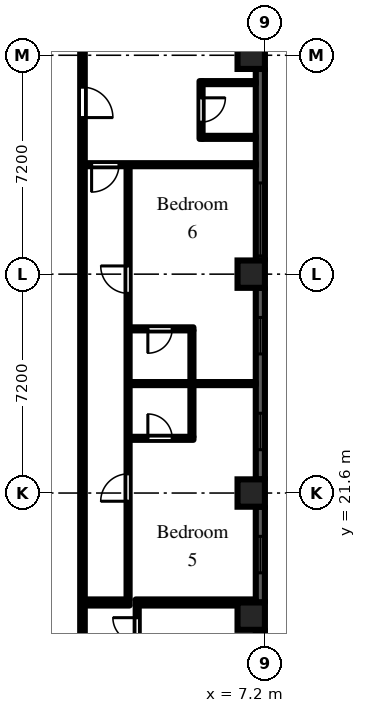
"""IFC4 building model, lengths in metres.
Left out: names, types, materials, properties, quantities, classifications, styles, units other than length and angle.
Written with IfcOpenShell. Run it as: python <this file> out.ifc"""

import sys

from ifc_helpers import new_model, si_unit, direction, frame, frame_2d, origin, origin_2d, place, context, subcontext, project, spatial, rectangle, extrude, element, fill, save


model = new_model("IFC4")
c1 = context("Model", 3, precision=1e-05, world=origin(), true_north=direction((0.0, 1.0)))
c2 = subcontext(c1, "Body", "Model", "MODEL_VIEW")
j1 = project(units=[si_unit("LENGTHUNIT", "METRE"), si_unit("PLANEANGLEUNIT", "RADIAN")], contexts=[c1])
p1 = place(None, origin())
s1 = spatial("IfcSite", under=j1, at=p1, CompositionType="ELEMENT")
p2 = place(p1, origin())
s2 = spatial("IfcBuilding", under=s1, at=p2, CompositionType="ELEMENT")
p3 = place(p2, frame((0.0, 0.0, 29.7)))
s3 = spatial("IfcBuildingStorey", under=s2, at=p3, CompositionType="ELEMENT", Elevation=29.7)
for number, where, z_axis, x_axis in (
    (1, (6.75, 17.55, 0.0), (0.0, 0.0, 1.0), (1.0, 0.0, 0.0)),
    (2, (6.75, 21.6, 0.0), (0.0, 0.0, 1.0), (1.0, 0.0, 0.0)),
    (3, (6.75, 28.8, 0.0), (0.0, 0.0, 1.0), (1.0, 0.0, 0.0)),
    (4, (6.75, 36.0, 0.0), (0.0, 0.0, 1.0), (1.0, 0.0, 0.0)),
):
    element("IfcColumn", number, at=place(p3, frame(where, z_axis=z_axis, x_axis=x_axis)), inside=s3, PredefinedType="COLUMN", context=c2, shape_type="SweptSolid", body=[
        extrude(rectangle(XDim=0.9, YDim=0.9, at=origin_2d()), origin(), (0.0, 0.0, 1.0), 3.0),
    ])
p4 = place(p3, frame((7.05, 15.3, 0.0), z_axis=(0.0, 0.0, 1.0), x_axis=(0.0, 1.0, 0.0)))
e5 = element("IfcWall", 5, at=p4, inside=s3, PredefinedType="SOLIDWALL", context=c2, shape_type="SweptSolid", body=[
    extrude(rectangle(XDim=1.8, YDim=0.3, at=frame_2d((0.9, 0.0))), origin(), (0.0, 0.0, 1.0), 2.1),
])
p5 = place(p4, frame((0.3, 0.0, 0.2)))
e6 = element("IfcOpeningElement", 6, at=p5, cuts=e5, PredefinedType="OPENING", context=c2, shape_type="SweptSolid", body=[
    extrude(rectangle(XDim=1.2, YDim=1.85, at=frame_2d((0.6, 0.925))), frame((0.0, 0.16, 0.0), z_axis=(0.0, -1.0, 0.0), x_axis=(1.0, 0.0, 0.0)), (0.0, 0.0, 1.0), 0.32),
])
p6 = place(p3, frame((7.05, 18.0, 0.0), z_axis=(0.0, 0.0, 1.0), x_axis=(0.0, 1.0, 0.0)))
e7 = element("IfcWall", 7, at=p6, inside=s3, PredefinedType="SOLIDWALL", context=c2, shape_type="SweptSolid", body=[
    extrude(rectangle(XDim=3.15, YDim=0.3, at=frame_2d((1.575, 0.0))), origin(), (0.0, 0.0, 1.0), 2.1),
])
p7 = place(p6, frame((0.975, 0.0, 0.2)))
e8 = element("IfcOpeningElement", 8, at=p7, cuts=e7, PredefinedType="OPENING", context=c2, shape_type="SweptSolid", body=[
    extrude(rectangle(XDim=1.2, YDim=1.85, at=frame_2d((0.6, 0.925))), frame((0.0, 0.16, 0.0), z_axis=(0.0, -1.0, 0.0), x_axis=(1.0, 0.0, 0.0)), (0.0, 0.0, 1.0), 0.32),
])
p8 = place(p3, frame((7.05, 22.05, 0.0), z_axis=(0.0, 0.0, 1.0), x_axis=(0.0, 1.0, 0.0)))
e9 = element("IfcWall", 9, at=p8, inside=s3, PredefinedType="SOLIDWALL", context=c2, shape_type="SweptSolid", body=[
    extrude(rectangle(XDim=6.3, YDim=0.3, at=frame_2d((3.15, 0.0))), origin(), (0.0, 0.0, 1.0), 2.1),
])
p9 = place(p8, frame((0.975, 0.0, 0.2)))
e10 = element("IfcOpeningElement", 10, at=p9, cuts=e9, PredefinedType="OPENING", context=c2, shape_type="SweptSolid", body=[
    extrude(rectangle(XDim=1.2, YDim=1.85, at=frame_2d((0.6, 0.925))), frame((0.0, 0.16, 0.0), z_axis=(0.0, -1.0, 0.0), x_axis=(1.0, 0.0, 0.0)), (0.0, 0.0, 1.0), 0.32),
])
p10 = place(p8, frame((4.125, 0.0, 0.2)))
e11 = element("IfcOpeningElement", 11, at=p10, cuts=e9, PredefinedType="OPENING", context=c2, shape_type="SweptSolid", body=[
    extrude(rectangle(XDim=1.2, YDim=1.85, at=frame_2d((0.6, 0.925))), frame((0.0, 0.16, 0.0), z_axis=(0.0, -1.0, 0.0), x_axis=(1.0, 0.0, 0.0)), (0.0, 0.0, 1.0), 0.32),
])
p11 = place(p3, frame((7.05, 29.25, 0.0), z_axis=(0.0, 0.0, 1.0), x_axis=(0.0, 1.0, 0.0)))
e12 = element("IfcWall", 12, at=p11, inside=s3, PredefinedType="SOLIDWALL", context=c2, shape_type="SweptSolid", body=[
    extrude(rectangle(XDim=6.3, YDim=0.3, at=frame_2d((3.15, 0.0))), origin(), (0.0, 0.0, 1.0), 2.1),
])
p12 = place(p11, frame((0.15, 0.0, 0.2)))
e13 = element("IfcOpeningElement", 13, at=p12, cuts=e12, PredefinedType="OPENING", context=c2, shape_type="SweptSolid", body=[
    extrude(rectangle(XDim=2.4, YDim=1.85, at=frame_2d((1.2, 0.925))), frame((0.0, 0.16, 0.0), z_axis=(0.0, -1.0, 0.0), x_axis=(1.0, 0.0, 0.0)), (0.0, 0.0, 1.0), 0.32),
])
p13 = place(p3, frame((1.2, 1.125, 0.0), z_axis=(0.0, 0.0, 1.0), x_axis=(0.0, 1.0, 0.0)))
e14 = element("IfcWall", 14, at=p13, inside=s3, PredefinedType="PARTITIONING", context=c2, shape_type="SweptSolid", body=[
    extrude(rectangle(XDim=35.375, YDim=0.15, at=frame_2d((17.688, 0.0))), origin(), (0.0, 0.0, 1.0), 2.575),
])
p14 = place(p13, frame((3.725, 0.0, 0.0)))
e15 = element("IfcOpeningElement", 15, at=p14, cuts=e14, PredefinedType="OPENING", context=c2, shape_type="SweptSolid", body=[
    extrude(rectangle(XDim=0.9, YDim=2.1, at=frame_2d((0.45, 1.05))), frame((0.0, 0.085, 0.0), z_axis=(0.0, -1.0, 0.0), x_axis=(1.0, 0.0, 0.0)), (0.0, 0.0, 1.0), 0.17),
])
p15 = place(p13, frame((7.425, 0.0, 0.0)))
e16 = element("IfcOpeningElement", 16, at=p15, cuts=e14, PredefinedType="OPENING", context=c2, shape_type="SweptSolid", body=[
    extrude(rectangle(XDim=0.9, YDim=2.1, at=frame_2d((0.45, 1.05))), frame((0.0, 0.085, 0.0), z_axis=(0.0, -1.0, 0.0), x_axis=(1.0, 0.0, 0.0)), (0.0, 0.0, 1.0), 0.17),
])
p16 = place(p13, frame((13.475, 0.0, 0.0)))
e17 = element("IfcOpeningElement", 17, at=p16, cuts=e14, PredefinedType="OPENING", context=c2, shape_type="SweptSolid", body=[
    extrude(rectangle(XDim=1.0, YDim=2.1, at=frame_2d((0.5, 1.05))), frame((0.0, 0.085, 0.0), z_axis=(0.0, -1.0, 0.0), x_axis=(1.0, 0.0, 0.0)), (0.0, 0.0, 1.0), 0.17),
])
p17 = place(p13, frame((32.825, 0.0, 0.0)))
e18 = element("IfcOpeningElement", 18, at=p17, cuts=e14, PredefinedType="OPENING", context=c2, shape_type="SweptSolid", body=[
    extrude(rectangle(XDim=1.0, YDim=2.1, at=frame_2d((0.5, 1.05))), frame((0.0, 0.085, 0.0), z_axis=(0.0, -1.0, 0.0), x_axis=(1.0, 0.0, 0.0)), (0.0, 0.0, 1.0), 0.17),
])
p18 = place(p3, frame((1.275, 18.0, 0.0), z_axis=(0.0, 0.0, 1.0), x_axis=(1.0, 0.0, 0.0)))
e19 = element("IfcWall", 19, at=p18, inside=s3, PredefinedType="PARTITIONING", context=c2, shape_type="SweptSolid", body=[
    extrude(rectangle(XDim=1.475, YDim=0.2, at=frame_2d((0.738, 0.0))), origin(), (0.0, 0.0, 1.0), 2.575),
])
p19 = place(p3, frame((1.275, 32.4, 0.0), z_axis=(0.0, 0.0, 1.0), x_axis=(1.0, 0.0, 0.0)))
e20 = element("IfcWall", 20, at=p19, inside=s3, PredefinedType="PARTITIONING", context=c2, shape_type="SweptSolid", body=[
    extrude(rectangle(XDim=5.625, YDim=0.1, at=frame_2d((2.812, 0.0))), origin(), (0.0, 0.0, 1.0), 2.575),
])
p20 = place(p19, frame((0.225, 0.0, 0.0)))
e21 = element("IfcOpeningElement", 21, at=p20, cuts=e20, PredefinedType="OPENING", context=c2, shape_type="SweptSolid", body=[
    extrude(rectangle(XDim=0.9, YDim=2.1, at=frame_2d((0.45, 1.05))), frame((0.0, 0.06, 0.0), z_axis=(0.0, -1.0, 0.0), x_axis=(1.0, 0.0, 0.0)), (0.0, 0.0, 1.0), 0.12),
])
p21 = place(p3, frame((2.7, 18.1, 0.0), z_axis=(0.0, 0.0, 1.0), x_axis=(0.0, 1.0, 0.0)))
e22 = element("IfcWall", 22, at=p21, inside=s3, PredefinedType="PARTITIONING", context=c2, shape_type="SweptSolid", body=[
    extrude(rectangle(XDim=14.25, YDim=0.1, at=frame_2d((7.125, 0.0))), origin(), (0.0, 0.0, 1.0), 2.575),
])
p22 = place(p21, frame((3.23, 0.0, 0.0)))
e23 = element("IfcOpeningElement", 23, at=p22, cuts=e22, PredefinedType="OPENING", context=c2, shape_type="SweptSolid", body=[
    extrude(rectangle(XDim=0.9, YDim=2.1, at=frame_2d((0.45, 1.05))), frame((0.0, 0.06, 0.0), z_axis=(0.0, -1.0, 0.0), x_axis=(1.0, 0.0, 0.0)), (0.0, 0.0, 1.0), 0.12),
])
p23 = place(p21, frame((10.07, 0.0, 0.0)))
e24 = element("IfcOpeningElement", 24, at=p23, cuts=e22, PredefinedType="OPENING", context=c2, shape_type="SweptSolid", body=[
    extrude(rectangle(XDim=0.9, YDim=2.1, at=frame_2d((0.45, 1.05))), frame((0.0, 0.06, 0.0), z_axis=(0.0, -1.0, 0.0), x_axis=(1.0, 0.0, 0.0)), (0.0, 0.0, 1.0), 0.12),
])
p24 = place(p3, frame((2.75, 23.4, 0.0), z_axis=(0.0, 0.0, 1.0), x_axis=(1.0, 0.0, 0.0)))
e25 = element("IfcWall", 25, at=p24, inside=s3, PredefinedType="PARTITIONING", context=c2, shape_type="SweptSolid", body=[
    extrude(rectangle(XDim=2.1, YDim=0.1, at=frame_2d((1.05, 0.0))), origin(), (0.0, 0.0, 1.0), 2.575),
])
p25 = place(p24, frame((0.6, 0.0, 0.0)))
e26 = element("IfcOpeningElement", 26, at=p25, cuts=e25, PredefinedType="OPENING", context=c2, shape_type="SweptSolid", body=[
    extrude(rectangle(XDim=0.8, YDim=2.1, at=frame_2d((0.4, 1.05))), frame((0.0, 0.06, 0.0), z_axis=(0.0, -1.0, 0.0), x_axis=(1.0, 0.0, 0.0)), (0.0, 0.0, 1.0), 0.12),
])
p26 = place(p3, frame((2.75, 25.2, 0.0), z_axis=(0.0, 0.0, 1.0), x_axis=(1.0, 0.0, 0.0)))
e27 = element("IfcWall", 27, at=p26, inside=s3, PredefinedType="PARTITIONING", context=c2, shape_type="SweptSolid", body=[
    extrude(rectangle(XDim=4.15, YDim=0.1, at=frame_2d((2.075, 0.0))), origin(), (0.0, 0.0, 1.0), 2.575),
])
p27 = place(p3, frame((2.75, 27.0, 0.0), z_axis=(0.0, 0.0, 1.0), x_axis=(1.0, 0.0, 0.0)))
e28 = element("IfcWall", 28, at=p27, inside=s3, PredefinedType="PARTITIONING", context=c2, shape_type="SweptSolid", body=[
    extrude(rectangle(XDim=2.1, YDim=0.1, at=frame_2d((1.05, 0.0))), origin(), (0.0, 0.0, 1.0), 2.575),
])
p28 = place(p27, frame((0.6, 0.0, 0.0)))
e29 = element("IfcOpeningElement", 29, at=p28, cuts=e28, PredefinedType="OPENING", context=c2, shape_type="SweptSolid", body=[
    extrude(rectangle(XDim=0.8, YDim=2.1, at=frame_2d((0.4, 1.05))), frame((0.0, 0.06, 0.0), z_axis=(0.0, -1.0, 0.0), x_axis=(1.0, 0.0, 0.0)), (0.0, 0.0, 1.0), 0.12),
])
p29 = place(p3, frame((3.0, 16.25, 0.0), z_axis=(0.0, 0.0, 1.0), x_axis=(0.0, 1.0, 0.0)))
e30 = element("IfcWall", 30, at=p29, inside=s3, PredefinedType="PARTITIONING", context=c2, shape_type="SweptSolid", body=[
    extrude(rectangle(XDim=1.65, YDim=0.1, at=frame_2d((0.825, 0.0))), origin(), (0.0, 0.0, 1.0), 2.575),
])
p30 = place(p29, frame((0.45, 0.0, 0.0)))
e31 = element("IfcOpeningElement", 31, at=p30, cuts=e30, PredefinedType="OPENING", context=c2, shape_type="SweptSolid", body=[
    extrude(rectangle(XDim=0.8, YDim=2.1, at=frame_2d((0.4, 1.05))), frame((0.0, 0.06, 0.0), z_axis=(0.0, -1.0, 0.0), x_axis=(1.0, 0.0, 0.0)), (0.0, 0.0, 1.0), 0.12),
])
p31 = place(p3, frame((2.95, 18.0, 0.0), z_axis=(0.0, 0.0, 1.0), x_axis=(1.0, 0.0, 0.0)))
e32 = element("IfcWall", 32, at=p31, inside=s3, PredefinedType="PARTITIONING", context=c2, shape_type="SweptSolid", body=[
    extrude(rectangle(XDim=3.95, YDim=0.2, at=frame_2d((1.975, 0.0))), origin(), (0.0, 0.0, 1.0), 2.575),
])
p32 = place(p3, frame((4.8, 23.45, 0.0), z_axis=(0.0, 0.0, 1.0), x_axis=(0.0, 1.0, 0.0)))
e33 = element("IfcWall", 33, at=p32, inside=s3, PredefinedType="PARTITIONING", context=c2, shape_type="SweptSolid", body=[
    extrude(rectangle(XDim=3.5, YDim=0.1, at=frame_2d((1.75, 0.0))), origin(), (0.0, 0.0, 1.0), 2.575),
])
p33 = place(p3, frame((5.1, 33.25, 0.0), z_axis=(0.0, 0.0, 1.0), x_axis=(0.0, 1.0, 0.0)))
e34 = element("IfcWall", 34, at=p33, inside=s3, PredefinedType="PARTITIONING", context=c2, shape_type="SweptSolid", body=[
    extrude(rectangle(XDim=1.9, YDim=0.1, at=frame_2d((0.95, 0.0))), origin(), (0.0, 0.0, 1.0), 2.575),
])
p34 = place(p33, frame((0.55, 0.0, 0.0)))
e35 = element("IfcOpeningElement", 35, at=p34, cuts=e34, PredefinedType="OPENING", context=c2, shape_type="SweptSolid", body=[
    extrude(rectangle(XDim=0.8, YDim=2.1, at=frame_2d((0.4, 1.05))), frame((0.0, 0.06, 0.0), z_axis=(0.0, -1.0, 0.0), x_axis=(1.0, 0.0, 0.0)), (0.0, 0.0, 1.0), 0.12),
])
for number, where, z_axis, x_axis in (
    (36, (5.15, 33.3, 0.0), (0.0, 0.0, 1.0), (1.0, 0.0, 0.0)),
    (37, (5.15, 35.1, 0.0), (0.0, 0.0, 1.0), (1.0, 0.0, 0.0)),
):
    element("IfcWall", number, at=place(p3, frame(where, z_axis=z_axis, x_axis=x_axis)), inside=s3, PredefinedType="PARTITIONING", context=c2, shape_type="SweptSolid", body=[
        extrude(rectangle(XDim=1.75, YDim=0.1, at=frame_2d((0.875, 0.0))), origin(), (0.0, 0.0, 1.0), 2.575),
    ])
p35 = place(p7, origin())
e38 = element("IfcWindow", 38, at=p35, inside=s3, PartitioningType="SINGLE_PANEL", PredefinedType="WINDOW", context=c2, shape_type="SweptSolid", body=[
    extrude(rectangle(XDim=1.2, YDim=1.85, at=frame_2d((0.6, 0.925))), frame((0.0, 0.03, 0.0), z_axis=(0.0, -1.0, 0.0), x_axis=(1.0, 0.0, 0.0)), (0.0, 0.0, 1.0), 0.06),
])
fill(e8, e38)
p36 = place(p9, origin())
e39 = element("IfcWindow", 39, at=p36, inside=s3, PartitioningType="SINGLE_PANEL", PredefinedType="WINDOW", context=c2, shape_type="SweptSolid", body=[
    extrude(rectangle(XDim=1.2, YDim=1.85, at=frame_2d((0.6, 0.925))), frame((0.0, 0.03, 0.0), z_axis=(0.0, -1.0, 0.0), x_axis=(1.0, 0.0, 0.0)), (0.0, 0.0, 1.0), 0.06),
])
fill(e10, e39)
p37 = place(p10, origin())
e40 = element("IfcWindow", 40, at=p37, inside=s3, PartitioningType="SINGLE_PANEL", PredefinedType="WINDOW", context=c2, shape_type="SweptSolid", body=[
    extrude(rectangle(XDim=1.2, YDim=1.85, at=frame_2d((0.6, 0.925))), frame((0.0, 0.03, 0.0), z_axis=(0.0, -1.0, 0.0), x_axis=(1.0, 0.0, 0.0)), (0.0, 0.0, 1.0), 0.06),
])
fill(e11, e40)
p38 = place(p12, origin())
e41 = element("IfcWindow", 41, at=p38, inside=s3, PartitioningType="SINGLE_PANEL", PredefinedType="WINDOW", context=c2, shape_type="SweptSolid", body=[
    extrude(rectangle(XDim=2.4, YDim=1.85, at=frame_2d((1.2, 0.925))), frame((0.0, 0.03, 0.0), z_axis=(0.0, -1.0, 0.0), x_axis=(1.0, 0.0, 0.0)), (0.0, 0.0, 1.0), 0.06),
])
fill(e13, e41)
p39 = place(p30, origin())
e42 = element("IfcDoor", 42, at=p39, inside=s3, OperationType="SINGLE_SWING_RIGHT", PredefinedType="DOOR", context=c2, shape_type="SweptSolid", body=[
    extrude(rectangle(XDim=0.8, YDim=2.1, at=frame_2d((0.4, 1.05))), frame((0.0, 0.025, 0.0), z_axis=(0.0, -1.0, 0.0), x_axis=(1.0, 0.0, 0.0)), (0.0, 0.0, 1.0), 0.05),
])
fill(e31, e42)
p40 = place(p34, frame((0.8, 0.0, 0.0), z_axis=(0.0, 0.0, 1.0), x_axis=(-1.0, 0.0, 0.0)))
e43 = element("IfcDoor", 43, at=p40, inside=s3, OperationType="SINGLE_SWING_LEFT", PredefinedType="DOOR", context=c2, shape_type="SweptSolid", body=[
    extrude(rectangle(XDim=0.8, YDim=2.1, at=frame_2d((0.4, 1.05))), frame((0.0, 0.025, 0.0), z_axis=(0.0, -1.0, 0.0), x_axis=(1.0, 0.0, 0.0)), (0.0, 0.0, 1.0), 0.05),
])
fill(e35, e43)
p41 = place(p17, frame((1.0, 0.0, 0.0), z_axis=(0.0, 0.0, 1.0), x_axis=(-1.0, 0.0, 0.0)))
e44 = element("IfcDoor", 44, at=p41, inside=s3, OperationType="SINGLE_SWING_RIGHT", PredefinedType="DOOR", context=c2, shape_type="SweptSolid", body=[
    extrude(rectangle(XDim=1.0, YDim=2.1, at=frame_2d((0.5, 1.05))), frame((0.0, 0.025, 0.0), z_axis=(0.0, -1.0, 0.0), x_axis=(1.0, 0.0, 0.0)), (0.0, 0.0, 1.0), 0.05),
])
fill(e18, e44)
p42 = place(p20, frame((0.9, 0.0, 0.0), z_axis=(0.0, 0.0, 1.0), x_axis=(-1.0, 0.0, 0.0)))
e45 = element("IfcDoor", 45, at=p42, inside=s3, OperationType="SINGLE_SWING_RIGHT", PredefinedType="DOOR", context=c2, shape_type="SweptSolid", body=[
    extrude(rectangle(XDim=0.9, YDim=2.1, at=frame_2d((0.45, 1.05))), frame((0.0, 0.025, 0.0), z_axis=(0.0, -1.0, 0.0), x_axis=(1.0, 0.0, 0.0)), (0.0, 0.0, 1.0), 0.05),
])
fill(e21, e45)
p43 = place(p22, origin())
e46 = element("IfcDoor", 46, at=p43, inside=s3, OperationType="SINGLE_SWING_LEFT", PredefinedType="DOOR", context=c2, shape_type="SweptSolid", body=[
    extrude(rectangle(XDim=0.9, YDim=2.1, at=frame_2d((0.45, 1.05))), frame((0.0, 0.025, 0.0), z_axis=(0.0, -1.0, 0.0), x_axis=(1.0, 0.0, 0.0)), (0.0, 0.0, 1.0), 0.05),
])
fill(e23, e46)
p44 = place(p23, origin())
e47 = element("IfcDoor", 47, at=p44, inside=s3, OperationType="SINGLE_SWING_RIGHT", PredefinedType="DOOR", context=c2, shape_type="SweptSolid", body=[
    extrude(rectangle(XDim=0.9, YDim=2.1, at=frame_2d((0.45, 1.05))), frame((0.0, 0.025, 0.0), z_axis=(0.0, -1.0, 0.0), x_axis=(1.0, 0.0, 0.0)), (0.0, 0.0, 1.0), 0.05),
])
fill(e24, e47)
p45 = place(p25, origin())
e48 = element("IfcDoor", 48, at=p45, inside=s3, OperationType="SINGLE_SWING_LEFT", PredefinedType="DOOR", context=c2, shape_type="SweptSolid", body=[
    extrude(rectangle(XDim=0.8, YDim=2.1, at=frame_2d((0.4, 1.05))), frame((0.0, 0.025, 0.0), z_axis=(0.0, -1.0, 0.0), x_axis=(1.0, 0.0, 0.0)), (0.0, 0.0, 1.0), 0.05),
])
fill(e26, e48)
p46 = place(p28, frame((0.8, 0.0, 0.0), z_axis=(0.0, 0.0, 1.0), x_axis=(-1.0, 0.0, 0.0)))
e49 = element("IfcDoor", 49, at=p46, inside=s3, OperationType="SINGLE_SWING_RIGHT", PredefinedType="DOOR", context=c2, shape_type="SweptSolid", body=[
    extrude(rectangle(XDim=0.8, YDim=2.1, at=frame_2d((0.4, 1.05))), frame((0.0, 0.025, 0.0), z_axis=(0.0, -1.0, 0.0), x_axis=(1.0, 0.0, 0.0)), (0.0, 0.0, 1.0), 0.05),
])
fill(e29, e49)
save(model, sys.argv[1])
